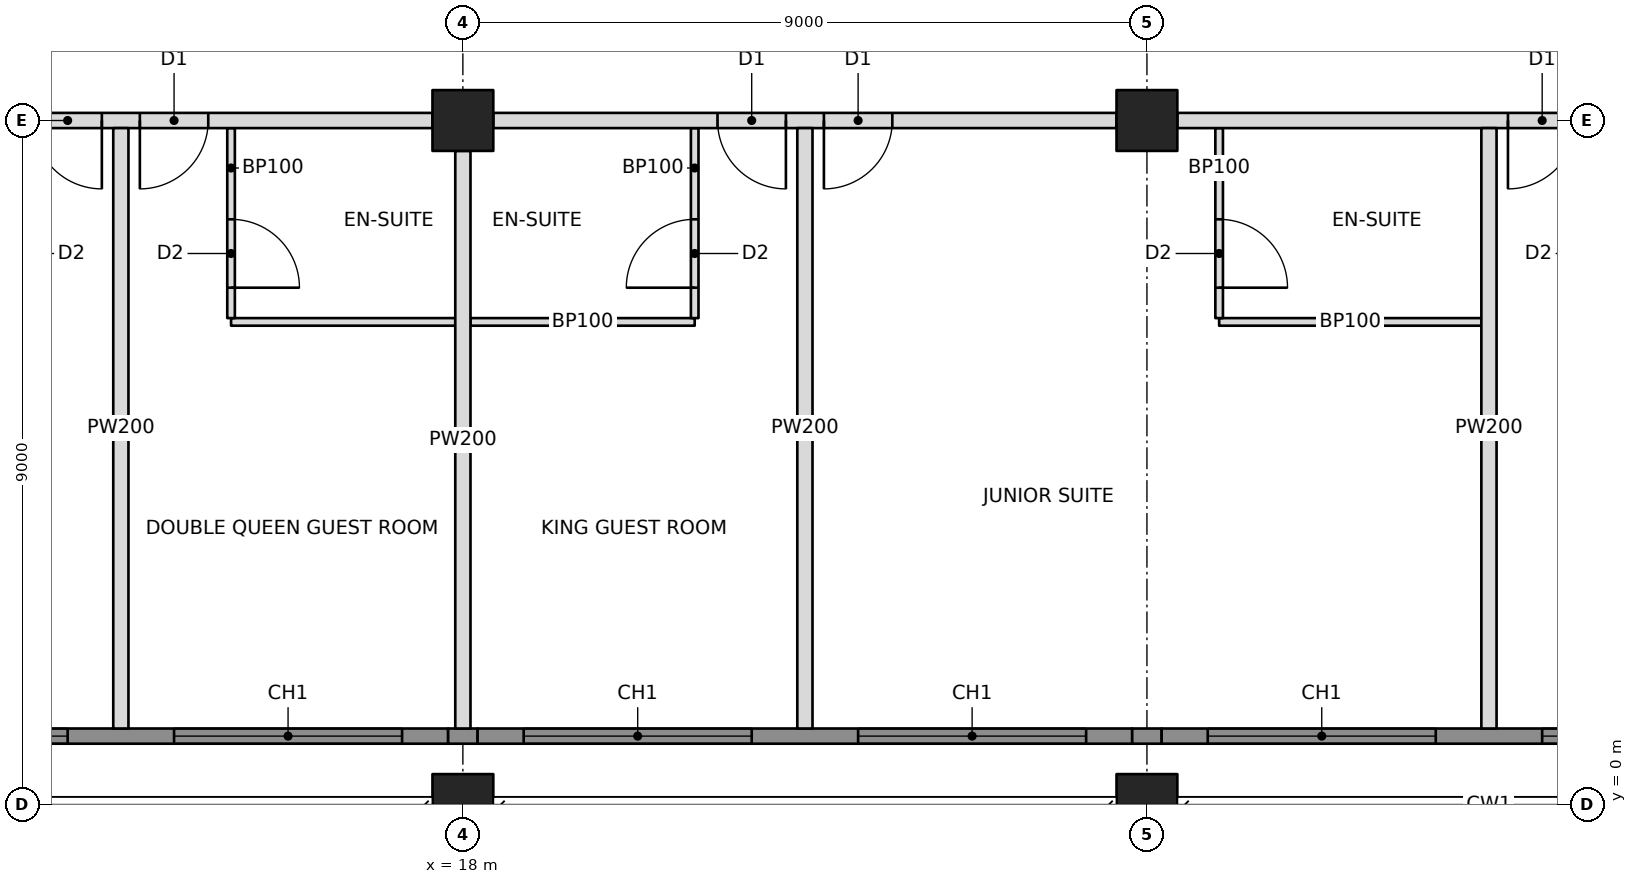
"""IFC4 building model, lengths in metres.
Left out: names, types, materials, properties, quantities, classifications, styles, units other than length and angle.
Written with IfcOpenShell. Run it as: python <this file> out.ifc"""

import sys

from ifc_helpers import new_model, si_unit, direction, frame, frame_2d, origin, origin_2d, place, context, subcontext, project, spatial, rectangle, hollow_rectangle, extrude, element, fill, save


model = new_model("IFC4")
c1 = context("Model", 3, precision=1e-05, world=origin(), true_north=direction((0.0, 1.0)))
c2 = subcontext(c1, "Body", "Model", "MODEL_VIEW")
j1 = project(units=[si_unit("LENGTHUNIT", "METRE"), si_unit("PLANEANGLEUNIT", "RADIAN")], contexts=[c1])
p1 = place(None, origin())
s1 = spatial("IfcSite", under=j1, at=p1, CompositionType="ELEMENT")
p2 = place(p1, origin())
s2 = spatial("IfcBuilding", under=s1, at=p2, CompositionType="ELEMENT")
p3 = place(p2, frame((0.0, 0.0, 82.4)))
s3 = spatial("IfcBuildingStorey", under=s2, at=p3, CompositionType="ELEMENT", Elevation=82.4)
p4 = place(p3, frame((18.0, 0.0, 0.0), z_axis=(0.0, 0.0, 1.0), x_axis=(1.0, 0.0, 0.0)))
e1 = element("IfcColumn", 1, at=p4, inside=s3, PredefinedType="COLUMN", context=c2, shape_type="SweptSolid", body=[
    extrude(hollow_rectangle(XDim=0.8, YDim=0.8, WallThickness=0.07, at=origin_2d()), origin(), (0.0, 0.0, 1.0), 3.4),
])
p5 = place(p3, frame((18.0, 9.0, 0.0), z_axis=(0.0, 0.0, 1.0), x_axis=(1.0, 0.0, 0.0)))
e2 = element("IfcColumn", 2, at=p5, inside=s3, PredefinedType="COLUMN", context=c2, shape_type="SweptSolid", body=[
    extrude(hollow_rectangle(XDim=0.8, YDim=0.8, WallThickness=0.09, at=origin_2d()), origin(), (0.0, 0.0, 1.0), 3.4),
])
p6 = place(p3, frame((27.0, 0.0, 0.0), z_axis=(0.0, 0.0, 1.0), x_axis=(1.0, 0.0, 0.0)))
e3 = element("IfcColumn", 3, at=p6, inside=s3, PredefinedType="COLUMN", context=c2, shape_type="SweptSolid", body=[
    extrude(hollow_rectangle(XDim=0.8, YDim=0.8, WallThickness=0.07, at=origin_2d()), origin(), (0.0, 0.0, 1.0), 3.4),
])
p7 = place(p3, frame((27.0, 9.0, 0.0), z_axis=(0.0, 0.0, 1.0), x_axis=(1.0, 0.0, 0.0)))
e4 = element("IfcColumn", 4, at=p7, inside=s3, PredefinedType="COLUMN", context=c2, shape_type="SweptSolid", body=[
    extrude(hollow_rectangle(XDim=0.8, YDim=0.8, WallThickness=0.09, at=origin_2d()), origin(), (0.0, 0.0, 1.0), 3.4),
])
p8 = place(p3, frame((9.4, 9.0, 0.0), z_axis=(0.0, 0.0, 1.0), x_axis=(1.0, 0.0, 0.0)))
e5 = element("IfcWall", 5, at=p8, inside=s3, PredefinedType="PARTITIONING", context=c2, shape_type="SweptSolid", body=[
    extrude(rectangle(XDim=8.2, YDim=0.2, at=frame_2d((4.1, 0.0))), origin(), (0.0, 0.0, 1.0), 2.405),
])
p9 = place(p8, frame((2.95, 0.0, 0.0)))
e6 = element("IfcOpeningElement", 6, at=p9, cuts=e5, PredefinedType="OPENING", context=c2, shape_type="SweptSolid", body=[
    extrude(rectangle(XDim=0.9, YDim=2.1, at=frame_2d((0.45, 1.05))), frame((0.0, 0.11, 0.0), z_axis=(0.0, -1.0, 0.0), x_axis=(1.0, 0.0, 0.0)), (0.0, 0.0, 1.0), 0.22),
])
p10 = place(p8, frame((4.35, 0.0, 0.0)))
e7 = element("IfcOpeningElement", 7, at=p10, cuts=e5, PredefinedType="OPENING", context=c2, shape_type="SweptSolid", body=[
    extrude(rectangle(XDim=0.9, YDim=2.1, at=frame_2d((0.45, 1.05))), frame((0.0, 0.11, 0.0), z_axis=(0.0, -1.0, 0.0), x_axis=(1.0, 0.0, 0.0)), (0.0, 0.0, 1.0), 0.22),
])
p11 = place(p3, frame((18.4, 9.0, 0.0), z_axis=(0.0, 0.0, 1.0), x_axis=(1.0, 0.0, 0.0)))
e8 = element("IfcWall", 8, at=p11, inside=s3, PredefinedType="PARTITIONING", context=c2, shape_type="SweptSolid", body=[
    extrude(rectangle(XDim=8.2, YDim=0.2, at=frame_2d((4.1, 0.0))), origin(), (0.0, 0.0, 1.0), 2.405),
])
p12 = place(p11, frame((2.95, 0.0, 0.0)))
e9 = element("IfcOpeningElement", 9, at=p12, cuts=e8, PredefinedType="OPENING", context=c2, shape_type="SweptSolid", body=[
    extrude(rectangle(XDim=0.9, YDim=2.1, at=frame_2d((0.45, 1.05))), frame((0.0, 0.11, 0.0), z_axis=(0.0, -1.0, 0.0), x_axis=(1.0, 0.0, 0.0)), (0.0, 0.0, 1.0), 0.22),
])
p13 = place(p11, frame((4.35, 0.0, 0.0)))
e10 = element("IfcOpeningElement", 10, at=p13, cuts=e8, PredefinedType="OPENING", context=c2, shape_type="SweptSolid", body=[
    extrude(rectangle(XDim=0.9, YDim=2.1, at=frame_2d((0.45, 1.05))), frame((0.0, 0.11, 0.0), z_axis=(0.0, -1.0, 0.0), x_axis=(1.0, 0.0, 0.0)), (0.0, 0.0, 1.0), 0.22),
])
p14 = place(p3, frame((27.4, 9.0, 0.0), z_axis=(0.0, 0.0, 1.0), x_axis=(1.0, 0.0, 0.0)))
e11 = element("IfcWall", 11, at=p14, inside=s3, PredefinedType="PARTITIONING", context=c2, shape_type="SweptSolid", body=[
    extrude(rectangle(XDim=8.2, YDim=0.2, at=frame_2d((4.1, 0.0))), origin(), (0.0, 0.0, 1.0), 2.405),
])
p15 = place(p14, frame((4.35, 0.0, 0.0)))
e12 = element("IfcOpeningElement", 12, at=p15, cuts=e11, PredefinedType="OPENING", context=c2, shape_type="SweptSolid", body=[
    extrude(rectangle(XDim=0.9, YDim=2.1, at=frame_2d((0.45, 1.05))), frame((0.0, 0.11, 0.0), z_axis=(0.0, -1.0, 0.0), x_axis=(1.0, 0.0, 0.0)), (0.0, 0.0, 1.0), 0.22),
])
p16 = place(p3, frame((13.5, 8.9, 0.0), z_axis=(0.0, 0.0, 1.0), x_axis=(0.0, -1.0, 0.0)))
e13 = element("IfcWall", 13, at=p16, inside=s3, PredefinedType="PARTITIONING", context=c2, shape_type="SweptSolid", body=[
    extrude(rectangle(XDim=7.9, YDim=0.2, at=frame_2d((3.95, 0.0))), origin(), (0.0, 0.0, 1.0), 2.404),
])
p17 = place(p3, frame((18.0, 8.6, 0.0), z_axis=(0.0, 0.0, 1.0), x_axis=(0.0, -1.0, 0.0)))
e14 = element("IfcWall", 14, at=p17, inside=s3, PredefinedType="PARTITIONING", context=c2, shape_type="SweptSolid", body=[
    extrude(rectangle(XDim=7.6, YDim=0.2, at=frame_2d((3.8, 0.0))), origin(), (0.0, 0.0, 1.0), 2.405),
])
for number, where, z_axis, x_axis in (
    (15, (22.5, 8.9, 0.0), (0.0, 0.0, 1.0), (0.0, -1.0, 0.0)),
    (16, (31.5, 8.9, 0.0), (0.0, 0.0, 1.0), (0.0, -1.0, 0.0)),
):
    element("IfcWall", number, at=place(p3, frame(where, z_axis=z_axis, x_axis=x_axis)), inside=s3, PredefinedType="PARTITIONING", context=c2, shape_type="SweptSolid", body=[
        extrude(rectangle(XDim=7.9, YDim=0.2, at=frame_2d((3.95, 0.0))), origin(), (0.0, 0.0, 1.0), 2.404),
    ])
p18 = place(p3, frame((14.95, 6.35, 0.0), z_axis=(0.0, 0.0, 1.0), x_axis=(1.0, 0.0, 0.0)))
e17 = element("IfcWall", 17, at=p18, inside=s3, PredefinedType="PARTITIONING", context=c2, shape_type="SweptSolid", body=[
    extrude(rectangle(XDim=2.95, YDim=0.1, at=frame_2d((1.475, 0.0))), origin(), (0.0, 0.0, 1.0), 2.404),
])
p19 = place(p3, frame((14.95, 8.9, 0.0), z_axis=(0.0, 0.0, 1.0), x_axis=(0.0, -1.0, 0.0)))
e18 = element("IfcWall", 18, at=p19, inside=s3, PredefinedType="PARTITIONING", context=c2, shape_type="SweptSolid", body=[
    extrude(rectangle(XDim=2.5, YDim=0.1, at=frame_2d((1.25, 0.0))), origin(), (0.0, 0.0, 1.0), 2.404),
])
p20 = place(p19, frame((1.2, 0.0, 0.0)))
e19 = element("IfcOpeningElement", 19, at=p20, cuts=e18, PredefinedType="OPENING", context=c2, shape_type="SweptSolid", body=[
    extrude(rectangle(XDim=0.9, YDim=2.1, at=frame_2d((0.45, 1.05))), frame((0.0, 0.06, 0.0), z_axis=(0.0, -1.0, 0.0), x_axis=(1.0, 0.0, 0.0)), (0.0, 0.0, 1.0), 0.12),
])
p21 = place(p3, frame((18.1, 6.35, 0.0), z_axis=(0.0, 0.0, 1.0), x_axis=(1.0, 0.0, 0.0)))
e20 = element("IfcWall", 20, at=p21, inside=s3, PredefinedType="PARTITIONING", context=c2, shape_type="SweptSolid", body=[
    extrude(rectangle(XDim=2.95, YDim=0.1, at=frame_2d((1.475, 0.0))), origin(), (0.0, 0.0, 1.0), 2.404),
])
p22 = place(p3, frame((21.05, 8.9, 0.0), z_axis=(0.0, 0.0, 1.0), x_axis=(0.0, -1.0, 0.0)))
e21 = element("IfcWall", 21, at=p22, inside=s3, PredefinedType="PARTITIONING", context=c2, shape_type="SweptSolid", body=[
    extrude(rectangle(XDim=2.5, YDim=0.1, at=frame_2d((1.25, 0.0))), origin(), (0.0, 0.0, 1.0), 2.404),
])
p23 = place(p22, frame((1.2, 0.0, 0.0)))
e22 = element("IfcOpeningElement", 22, at=p23, cuts=e21, PredefinedType="OPENING", context=c2, shape_type="SweptSolid", body=[
    extrude(rectangle(XDim=0.9, YDim=2.1, at=frame_2d((0.45, 1.05))), frame((0.0, 0.06, 0.0), z_axis=(0.0, -1.0, 0.0), x_axis=(1.0, 0.0, 0.0)), (0.0, 0.0, 1.0), 0.12),
])
p24 = place(p3, frame((27.95, 6.35, 0.0), z_axis=(0.0, 0.0, 1.0), x_axis=(1.0, 0.0, 0.0)))
e23 = element("IfcWall", 23, at=p24, inside=s3, PredefinedType="PARTITIONING", context=c2, shape_type="SweptSolid", body=[
    extrude(rectangle(XDim=3.45, YDim=0.1, at=frame_2d((1.725, 0.0))), origin(), (0.0, 0.0, 1.0), 3.2),
])
p25 = place(p3, frame((27.95, 8.9, 0.0), z_axis=(0.0, 0.0, 1.0), x_axis=(0.0, -1.0, 0.0)))
e24 = element("IfcWall", 24, at=p25, inside=s3, PredefinedType="PARTITIONING", context=c2, shape_type="SweptSolid", body=[
    extrude(rectangle(XDim=2.5, YDim=0.1, at=frame_2d((1.25, 0.0))), origin(), (0.0, 0.0, 1.0), 2.404),
])
p26 = place(p25, frame((1.2, 0.0, 0.0)))
e25 = element("IfcOpeningElement", 25, at=p26, cuts=e24, PredefinedType="OPENING", context=c2, shape_type="SweptSolid", body=[
    extrude(rectangle(XDim=0.9, YDim=2.1, at=frame_2d((0.45, 1.05))), frame((0.0, 0.06, 0.0), z_axis=(0.0, -1.0, 0.0), x_axis=(1.0, 0.0, 0.0)), (0.0, 0.0, 1.0), 0.12),
])
p27 = place(p3, frame((9.135, 0.9, 0.0), z_axis=(0.0, 0.0, 1.0), x_axis=(1.0, 0.0, 0.0)))
e26 = element("IfcWall", 26, at=p27, inside=s3, PredefinedType="SOLIDWALL", context=c2, shape_type="SweptSolid", body=[
    extrude(rectangle(XDim=8.671, YDim=0.2, at=frame_2d((4.335, 0.0))), origin(), (0.0, 0.0, 1.0), 3.2),
])
p28 = place(p27, frame((0.665, 0.0, 0.6)))
e27 = element("IfcOpeningElement", 27, at=p28, cuts=e26, PredefinedType="OPENING", context=c2, shape_type="SweptSolid", body=[
    extrude(rectangle(XDim=3.0, YDim=2.2, at=frame_2d((1.5, 1.1))), frame((0.0, 0.11, 0.0), z_axis=(0.0, -1.0, 0.0), x_axis=(1.0, 0.0, 0.0)), (0.0, 0.0, 1.0), 0.22),
])
p29 = place(p27, frame((5.065, 0.0, 0.6)))
e28 = element("IfcOpeningElement", 28, at=p29, cuts=e26, PredefinedType="OPENING", context=c2, shape_type="SweptSolid", body=[
    extrude(rectangle(XDim=3.0, YDim=2.2, at=frame_2d((1.5, 1.1))), frame((0.0, 0.11, 0.0), z_axis=(0.0, -1.0, 0.0), x_axis=(1.0, 0.0, 0.0)), (0.0, 0.0, 1.0), 0.22),
])
p30 = place(p3, frame((17.806, 0.9, 0.0), z_axis=(0.0, 0.0, 1.0), x_axis=(1.0, 0.0, 0.0)))
e29 = element("IfcWall", 29, at=p30, inside=s3, PredefinedType="SOLIDWALL", context=c2, shape_type="SweptSolid", body=[
    extrude(rectangle(XDim=0.388, YDim=0.2, at=frame_2d((0.194, 0.0))), origin(), (0.0, 0.0, 1.0), 2.404),
])
p31 = place(p3, frame((18.194, 0.9, 0.0), z_axis=(0.0, 0.0, 1.0), x_axis=(1.0, 0.0, 0.0)))
e30 = element("IfcWall", 30, at=p31, inside=s3, PredefinedType="SOLIDWALL", context=c2, shape_type="SweptSolid", body=[
    extrude(rectangle(XDim=8.612, YDim=0.2, at=frame_2d((4.306, 0.0))), origin(), (0.0, 0.0, 1.0), 3.2),
])
p32 = place(p31, frame((0.606, 0.0, 0.6)))
e31 = element("IfcOpeningElement", 31, at=p32, cuts=e30, PredefinedType="OPENING", context=c2, shape_type="SweptSolid", body=[
    extrude(rectangle(XDim=3.0, YDim=2.2, at=frame_2d((1.5, 1.1))), frame((0.0, 0.11, 0.0), z_axis=(0.0, -1.0, 0.0), x_axis=(1.0, 0.0, 0.0)), (0.0, 0.0, 1.0), 0.22),
])
p33 = place(p31, frame((5.006, 0.0, 0.6)))
e32 = element("IfcOpeningElement", 32, at=p33, cuts=e30, PredefinedType="OPENING", context=c2, shape_type="SweptSolid", body=[
    extrude(rectangle(XDim=3.0, YDim=2.2, at=frame_2d((1.5, 1.1))), frame((0.0, 0.11, 0.0), z_axis=(0.0, -1.0, 0.0), x_axis=(1.0, 0.0, 0.0)), (0.0, 0.0, 1.0), 0.22),
])
p34 = place(p3, frame((26.806, 0.9, 0.0), z_axis=(0.0, 0.0, 1.0), x_axis=(1.0, 0.0, 0.0)))
e33 = element("IfcWall", 33, at=p34, inside=s3, PredefinedType="SOLIDWALL", context=c2, shape_type="SweptSolid", body=[
    extrude(rectangle(XDim=0.388, YDim=0.2, at=frame_2d((0.194, 0.0))), origin(), (0.0, 0.0, 1.0), 2.404),
])
p35 = place(p3, frame((27.194, 0.9, 0.0), z_axis=(0.0, 0.0, 1.0), x_axis=(1.0, 0.0, 0.0)))
e34 = element("IfcWall", 34, at=p35, inside=s3, PredefinedType="SOLIDWALL", context=c2, shape_type="SweptSolid", body=[
    extrude(rectangle(XDim=8.671, YDim=0.2, at=frame_2d((4.335, 0.0))), origin(), (0.0, 0.0, 1.0), 3.2),
])
p36 = place(p35, frame((0.606, 0.0, 0.6)))
e35 = element("IfcOpeningElement", 35, at=p36, cuts=e34, PredefinedType="OPENING", context=c2, shape_type="SweptSolid", body=[
    extrude(rectangle(XDim=3.0, YDim=2.2, at=frame_2d((1.5, 1.1))), frame((0.0, 0.11, 0.0), z_axis=(0.0, -1.0, 0.0), x_axis=(1.0, 0.0, 0.0)), (0.0, 0.0, 1.0), 0.22),
])
p37 = place(p35, frame((5.006, 0.0, 0.6)))
e36 = element("IfcOpeningElement", 36, at=p37, cuts=e34, PredefinedType="OPENING", context=c2, shape_type="SweptSolid", body=[
    extrude(rectangle(XDim=3.0, YDim=2.2, at=frame_2d((1.5, 1.1))), frame((0.0, 0.11, 0.0), z_axis=(0.0, -1.0, 0.0), x_axis=(1.0, 0.0, 0.0)), (0.0, 0.0, 1.0), 0.22),
])
p38 = place(p28, origin())
e37 = element("IfcWindow", 37, at=p38, inside=s3, PartitioningType="TRIPLE_PANEL_VERTICAL", PredefinedType="WINDOW", context=c2, shape_type="SweptSolid", body=[
    extrude(rectangle(XDim=3.0, YDim=2.2, at=frame_2d((1.5, 1.1))), frame((0.0, 0.03, 0.0), z_axis=(0.0, -1.0, 0.0), x_axis=(1.0, 0.0, 0.0)), (0.0, 0.0, 1.0), 0.06),
])
fill(e27, e37)
p39 = place(p29, origin())
e38 = element("IfcWindow", 38, at=p39, inside=s3, PartitioningType="TRIPLE_PANEL_VERTICAL", PredefinedType="WINDOW", context=c2, shape_type="SweptSolid", body=[
    extrude(rectangle(XDim=3.0, YDim=2.2, at=frame_2d((1.5, 1.1))), frame((0.0, 0.03, 0.0), z_axis=(0.0, -1.0, 0.0), x_axis=(1.0, 0.0, 0.0)), (0.0, 0.0, 1.0), 0.06),
])
fill(e28, e38)
p40 = place(p32, origin())
e39 = element("IfcWindow", 39, at=p40, inside=s3, PartitioningType="TRIPLE_PANEL_VERTICAL", PredefinedType="WINDOW", context=c2, shape_type="SweptSolid", body=[
    extrude(rectangle(XDim=3.0, YDim=2.2, at=frame_2d((1.5, 1.1))), frame((0.0, 0.03, 0.0), z_axis=(0.0, -1.0, 0.0), x_axis=(1.0, 0.0, 0.0)), (0.0, 0.0, 1.0), 0.06),
])
fill(e31, e39)
p41 = place(p33, origin())
e40 = element("IfcWindow", 40, at=p41, inside=s3, PartitioningType="TRIPLE_PANEL_VERTICAL", PredefinedType="WINDOW", context=c2, shape_type="SweptSolid", body=[
    extrude(rectangle(XDim=3.0, YDim=2.2, at=frame_2d((1.5, 1.1))), frame((0.0, 0.03, 0.0), z_axis=(0.0, -1.0, 0.0), x_axis=(1.0, 0.0, 0.0)), (0.0, 0.0, 1.0), 0.06),
])
fill(e32, e40)
p42 = place(p36, origin())
e41 = element("IfcWindow", 41, at=p42, inside=s3, PartitioningType="TRIPLE_PANEL_VERTICAL", PredefinedType="WINDOW", context=c2, shape_type="SweptSolid", body=[
    extrude(rectangle(XDim=3.0, YDim=2.2, at=frame_2d((1.5, 1.1))), frame((0.0, 0.03, 0.0), z_axis=(0.0, -1.0, 0.0), x_axis=(1.0, 0.0, 0.0)), (0.0, 0.0, 1.0), 0.06),
])
fill(e35, e41)
p43 = place(p37, origin())
e42 = element("IfcWindow", 42, at=p43, inside=s3, PartitioningType="TRIPLE_PANEL_VERTICAL", PredefinedType="WINDOW", context=c2, shape_type="SweptSolid", body=[
    extrude(rectangle(XDim=3.0, YDim=2.2, at=frame_2d((1.5, 1.1))), frame((0.0, 0.03, 0.0), z_axis=(0.0, -1.0, 0.0), x_axis=(1.0, 0.0, 0.0)), (0.0, 0.0, 1.0), 0.06),
])
fill(e36, e42)
p44 = place(p9, frame((0.9, 0.0, 0.0), z_axis=(0.0, 0.0, 1.0), x_axis=(-1.0, 0.0, 0.0)))
e43 = element("IfcDoor", 43, at=p44, inside=s3, OperationType="SINGLE_SWING_LEFT", PredefinedType="DOOR", context=c2, shape_type="SweptSolid", body=[
    extrude(rectangle(XDim=0.9, YDim=2.1, at=frame_2d((0.45, 1.05))), frame((0.0, 0.025, 0.0), z_axis=(0.0, -1.0, 0.0), x_axis=(1.0, 0.0, 0.0)), (0.0, 0.0, 1.0), 0.05),
])
fill(e6, e43)
p45 = place(p20, origin())
e44 = element("IfcDoor", 44, at=p45, inside=s3, OperationType="SINGLE_SWING_RIGHT", PredefinedType="DOOR", context=c2, shape_type="SweptSolid", body=[
    extrude(rectangle(XDim=0.9, YDim=2.1, at=frame_2d((0.45, 1.05))), frame((0.0, 0.025, 0.0), z_axis=(0.0, -1.0, 0.0), x_axis=(1.0, 0.0, 0.0)), (0.0, 0.0, 1.0), 0.05),
])
fill(e19, e44)
p46 = place(p10, frame((0.9, 0.0, 0.0), z_axis=(0.0, 0.0, 1.0), x_axis=(-1.0, 0.0, 0.0)))
e45 = element("IfcDoor", 45, at=p46, inside=s3, OperationType="SINGLE_SWING_RIGHT", PredefinedType="DOOR", context=c2, shape_type="SweptSolid", body=[
    extrude(rectangle(XDim=0.9, YDim=2.1, at=frame_2d((0.45, 1.05))), frame((0.0, 0.025, 0.0), z_axis=(0.0, -1.0, 0.0), x_axis=(1.0, 0.0, 0.0)), (0.0, 0.0, 1.0), 0.05),
])
fill(e7, e45)
p47 = place(p23, frame((0.9, 0.0, 0.0), z_axis=(0.0, 0.0, 1.0), x_axis=(-1.0, 0.0, 0.0)))
e46 = element("IfcDoor", 46, at=p47, inside=s3, OperationType="SINGLE_SWING_LEFT", PredefinedType="DOOR", context=c2, shape_type="SweptSolid", body=[
    extrude(rectangle(XDim=0.9, YDim=2.1, at=frame_2d((0.45, 1.05))), frame((0.0, 0.025, 0.0), z_axis=(0.0, -1.0, 0.0), x_axis=(1.0, 0.0, 0.0)), (0.0, 0.0, 1.0), 0.05),
])
fill(e22, e46)
p48 = place(p12, frame((0.9, 0.0, 0.0), z_axis=(0.0, 0.0, 1.0), x_axis=(-1.0, 0.0, 0.0)))
e47 = element("IfcDoor", 47, at=p48, inside=s3, OperationType="SINGLE_SWING_LEFT", PredefinedType="DOOR", context=c2, shape_type="SweptSolid", body=[
    extrude(rectangle(XDim=0.9, YDim=2.1, at=frame_2d((0.45, 1.05))), frame((0.0, 0.025, 0.0), z_axis=(0.0, -1.0, 0.0), x_axis=(1.0, 0.0, 0.0)), (0.0, 0.0, 1.0), 0.05),
])
fill(e9, e47)
p49 = place(p26, origin())
e48 = element("IfcDoor", 48, at=p49, inside=s3, OperationType="SINGLE_SWING_RIGHT", PredefinedType="DOOR", context=c2, shape_type="SweptSolid", body=[
    extrude(rectangle(XDim=0.9, YDim=2.1, at=frame_2d((0.45, 1.05))), frame((0.0, 0.025, 0.0), z_axis=(0.0, -1.0, 0.0), x_axis=(1.0, 0.0, 0.0)), (0.0, 0.0, 1.0), 0.05),
])
fill(e25, e48)
p50 = place(p13, frame((0.9, 0.0, 0.0), z_axis=(0.0, 0.0, 1.0), x_axis=(-1.0, 0.0, 0.0)))
e49 = element("IfcDoor", 49, at=p50, inside=s3, OperationType="SINGLE_SWING_RIGHT", PredefinedType="DOOR", context=c2, shape_type="SweptSolid", body=[
    extrude(rectangle(XDim=0.9, YDim=2.1, at=frame_2d((0.45, 1.05))), frame((0.0, 0.025, 0.0), z_axis=(0.0, -1.0, 0.0), x_axis=(1.0, 0.0, 0.0)), (0.0, 0.0, 1.0), 0.05),
])
fill(e10, e49)
p51 = place(p15, frame((0.9, 0.0, 0.0), z_axis=(0.0, 0.0, 1.0), x_axis=(-1.0, 0.0, 0.0)))
e50 = element("IfcDoor", 50, at=p51, inside=s3, OperationType="SINGLE_SWING_RIGHT", PredefinedType="DOOR", context=c2, shape_type="SweptSolid", body=[
    extrude(rectangle(XDim=0.9, YDim=2.1, at=frame_2d((0.45, 1.05))), frame((0.0, 0.025, 0.0), z_axis=(0.0, -1.0, 0.0), x_axis=(1.0, 0.0, 0.0)), (0.0, 0.0, 1.0), 0.05),
])
fill(e12, e50)
save(model, sys.argv[1])
